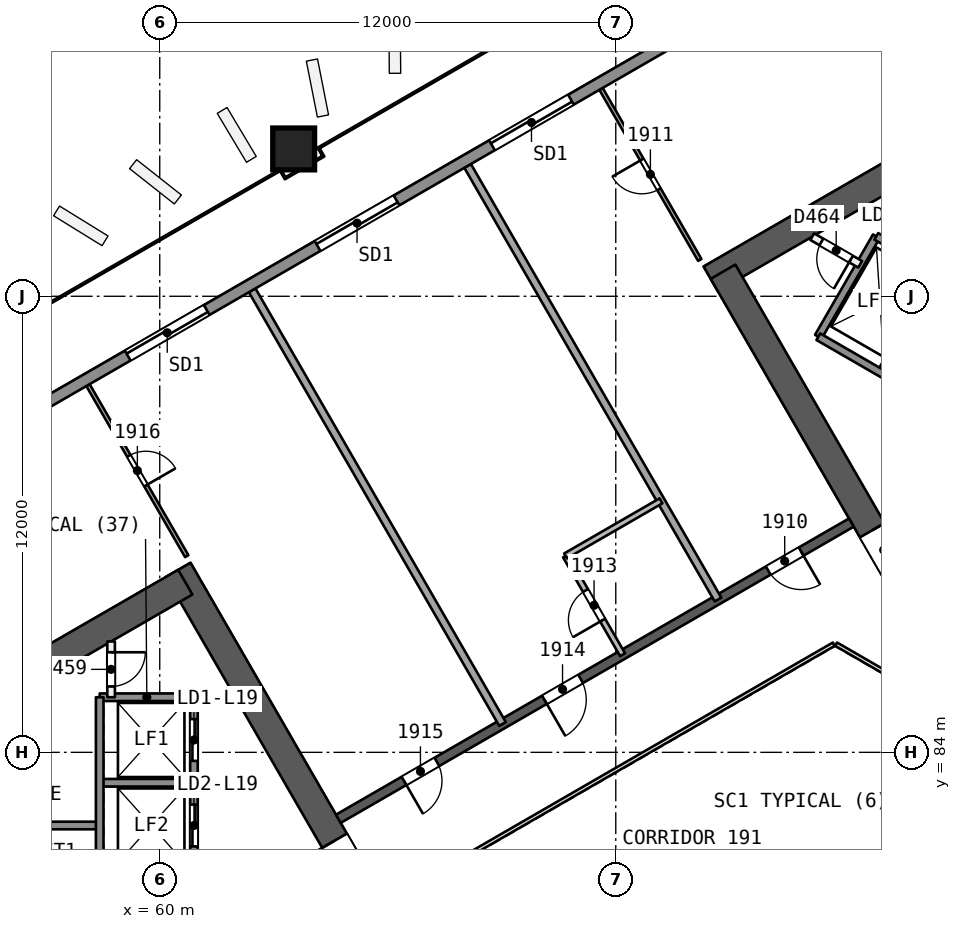
"""IFC4 building model, lengths in metres.
Left out: names, types, materials, properties, quantities, classifications, styles, units other than length and angle.
Written with IfcOpenShell. Run it as: python <this file> out.ifc"""

import sys

from ifc_helpers import new_model, si_unit, direction, frame, frame_2d, origin, origin_2d, place, context, subcontext, project, spatial, rectangle, extrude, element, fill, save


model = new_model("IFC4")
c1 = context("Model", 3, precision=1e-05, world=origin(), true_north=direction((0.0, 1.0)))
c2 = subcontext(c1, "Body", "Model", "MODEL_VIEW")
j1 = project(units=[si_unit("LENGTHUNIT", "METRE"), si_unit("PLANEANGLEUNIT", "RADIAN")], contexts=[c1])
p1 = place(None, origin())
s1 = spatial("IfcSite", under=j1, at=p1, CompositionType="ELEMENT")
p2 = place(p1, origin())
s2 = spatial("IfcBuilding", under=s1, at=p2, CompositionType="ELEMENT")
p3 = place(p2, frame((0.0, 0.0, 83.2)))
s3 = spatial("IfcBuildingStorey", under=s2, at=p3, CompositionType="ELEMENT", Elevation=83.2)
p4 = place(p3, frame((65.567, 80.0, 0.0), z_axis=(0.0, 0.0, 1.0), x_axis=(-0.499988615364, 0.866031976607, 0.0)))
e1 = element("IfcWall", 1, at=p4, inside=s3, PredefinedType="SHEAR", context=c2, shape_type="SweptSolid", body=[
    extrude(rectangle(XDim=10.163, YDim=0.75, at=frame_2d((5.082, 0.0))), origin(), (0.0, 0.0, 1.0), 3.7),
])
p5 = place(p4, frame((0.733, 0.0, 0.0)))
e2 = element("IfcOpeningElement", 2, at=p5, cuts=e1, PredefinedType="OPENING", context=c2, shape_type="SweptSolid", body=[
    extrude(rectangle(XDim=1.2, YDim=2.1, at=frame_2d((0.6, 1.05))), frame((0.0, 0.385, 0.0), z_axis=(0.0, -1.0, 0.0), x_axis=(1.0, 0.0, 0.0)), (0.0, 0.0, 1.0), 0.771),
])
p6 = place(p3, frame((60.673, 88.477, 0.0), z_axis=(0.0, 0.0, 1.0), x_axis=(-0.8660248072, -0.500001033313, 0.0)))
e3 = element("IfcWall", 3, at=p6, inside=s3, PredefinedType="SHEAR", context=c2, shape_type="SweptSolid", body=[
    extrude(rectangle(XDim=13.958, YDim=0.75, at=frame_2d((6.979, 0.0))), origin(), (0.0, 0.0, 1.0), 3.7),
])
p7 = place(p3, frame((86.723, 103.517, 0.0), z_axis=(0.0, 0.0, 1.0), x_axis=(-0.866020851292, -0.500007885066, 0.0)))
e4 = element("IfcWall", 4, at=p7, inside=s3, PredefinedType="SHEAR", context=c2, shape_type="SweptSolid", body=[
    extrude(rectangle(XDim=14.117, YDim=0.75, at=frame_2d((7.059, 0.0))), origin(), (0.0, 0.0, 1.0), 3.7),
])
p8 = place(p3, frame((74.822, 96.646, 0.0), z_axis=(0.0, 0.0, 1.0), x_axis=(0.499997052475, -0.866027105532, 0.0)))
e5 = element("IfcWall", 5, at=p8, inside=s3, PredefinedType="SHEAR", context=c2, shape_type="SweptSolid", body=[
    extrude(rectangle(XDim=10.005, YDim=0.75, at=frame_2d((5.002, 0.0))), origin(), (0.0, 0.0, 1.0), 3.7),
])
p9 = place(p8, frame((7.855, 0.0, 0.0)))
e6 = element("IfcOpeningElement", 6, at=p9, cuts=e5, PredefinedType="OPENING", context=c2, shape_type="SweptSolid", body=[
    extrude(rectangle(XDim=1.2, YDim=2.1, at=frame_2d((0.6, 1.05))), frame((0.0, 0.385, 0.0), z_axis=(0.0, -1.0, 0.0), x_axis=(1.0, 0.0, 0.0)), (0.0, 0.0, 1.0), 0.771),
])
p10 = place(p3, frame((78.2, 90.046, 0.0), z_axis=(0.0, 0.0, 1.0), x_axis=(-0.866026492143, -0.499998114903, 0.0)))
e7 = element("IfcWall", 7, at=p10, inside=s3, PredefinedType="SHEAR", context=c2, shape_type="SweptSolid", body=[
    extrude(rectangle(XDim=15.588, YDim=0.25, at=frame_2d((7.794, 0.0))), origin(), (0.0, 0.0, 1.0), 3.2),
])
p11 = place(p10, frame((1.527, 0.0, 0.0)))
e8 = element("IfcOpeningElement", 8, at=p11, cuts=e7, PredefinedType="OPENING", context=c2, shape_type="SweptSolid", body=[
    extrude(rectangle(XDim=1.0, YDim=2.1, at=frame_2d((0.5, 1.05))), frame((0.0, 0.135, 0.0), z_axis=(0.0, -1.0, 0.0), x_axis=(1.0, 0.0, 0.0)), (0.0, 0.0, 1.0), 0.271),
])
p12 = place(p10, frame((8.227, 0.0, 0.0)))
e9 = element("IfcOpeningElement", 9, at=p12, cuts=e7, PredefinedType="OPENING", context=c2, shape_type="SweptSolid", body=[
    extrude(rectangle(XDim=1.1, YDim=2.1, at=frame_2d((0.55, 1.05))), frame((0.0, 0.135, 0.0), z_axis=(0.0, -1.0, 0.0), x_axis=(1.0, 0.0, 0.0)), (0.0, 0.0, 1.0), 0.271),
])
p13 = place(p10, frame((12.594, 0.0, 0.0)))
e10 = element("IfcOpeningElement", 10, at=p13, cuts=e7, PredefinedType="OPENING", context=c2, shape_type="SweptSolid", body=[
    extrude(rectangle(XDim=1.0, YDim=2.1, at=frame_2d((0.5, 1.05))), frame((0.0, 0.135, 0.0), z_axis=(0.0, -1.0, 0.0), x_axis=(1.0, 0.0, 0.0)), (0.0, 0.0, 1.0), 0.271),
])
p14 = place(p3, frame((63.512, 99.898, 0.0), z_axis=(0.010093620709, -0.017482414954, 0.999796221231), x_axis=(-0.499897086036, 0.865849517735, 0.020187025824)))
e11 = element("IfcColumn", 11, at=p14, inside=s3, PredefinedType="COLUMN", context=c2, shape_type="SweptSolid", body=[
    extrude(rectangle(XDim=1.1, YDim=1.1, at=origin_2d()), origin(), (0.0, 0.0, 1.0), 3.701),
])
p15 = place(p3, frame((74.21, 96.956, 0.0), z_axis=(0.0, 0.0, 1.0), x_axis=(-0.499973171224, 0.866040892832, 0.0)))
e12 = element("IfcWall", 12, at=p15, inside=s3, PredefinedType="PARTITIONING", context=c2, shape_type="SweptSolid", body=[
    extrude(rectangle(XDim=5.198, YDim=0.1, at=frame_2d((2.599, 0.0))), origin(), (0.0, 0.0, 1.0), 3.2),
])
p16 = place(p15, frame((2.149, 0.0, 0.0)))
e13 = element("IfcOpeningElement", 13, at=p16, cuts=e12, PredefinedType="OPENING", context=c2, shape_type="SweptSolid", body=[
    extrude(rectangle(XDim=0.9, YDim=2.1, at=frame_2d((0.45, 1.05))), frame((0.0, 0.061, 0.0), z_axis=(0.0, -1.0, 0.0), x_axis=(1.0, 0.0, 0.0)), (0.0, 0.0, 1.0), 0.121),
])
p17 = place(p3, frame((68.102, 99.431, 0.0), z_axis=(0.0, 0.0, 1.0), x_axis=(0.499992964734, -0.866029465559, 0.0)))
e14 = element("IfcWall", 14, at=p17, inside=s3, PredefinedType="PARTITIONING", context=c2, shape_type="SweptSolid", body=[
    extrude(rectangle(XDim=13.177, YDim=0.2, at=frame_2d((6.588, 0.0))), origin(), (0.0, 0.0, 1.0), 3.2),
])
p18 = place(p3, frame((72.178, 86.569, 0.0), z_axis=(0.0, 0.0, 1.0), x_axis=(-0.499990139034, 0.866031096941, 0.0)))
e15 = element("IfcWall", 15, at=p18, inside=s3, PredefinedType="PARTITIONING", context=c2, shape_type="SweptSolid", body=[
    extrude(rectangle(XDim=3.0, YDim=0.15, at=frame_2d((1.5, 0.0))), origin(), (0.0, 0.0, 1.0), 3.2),
])
p19 = place(p18, frame((1.05, 0.0, 0.0)))
e16 = element("IfcOpeningElement", 16, at=p19, cuts=e15, PredefinedType="OPENING", context=c2, shape_type="SweptSolid", body=[
    extrude(rectangle(XDim=0.9, YDim=2.1, at=frame_2d((0.45, 1.05))), frame((0.0, 0.085, 0.0), z_axis=(0.0, -1.0, 0.0), x_axis=(1.0, 0.0, 0.0)), (0.0, 0.0, 1.0), 0.171),
])
p20 = place(p3, frame((70.678, 89.167, 0.0), z_axis=(0.0, 0.0, 1.0), x_axis=(0.866032775405, 0.499987231761, 0.0)))
e17 = element("IfcWall", 17, at=p20, inside=s3, PredefinedType="PARTITIONING", context=c2, shape_type="SweptSolid", body=[
    extrude(rectangle(XDim=2.9, YDim=0.15, at=frame_2d((1.45, 0.0))), origin(), (0.0, 0.0, 1.0), 3.2),
])
p21 = place(p3, frame((62.432, 96.157, 0.0), z_axis=(0.0, 0.0, 1.0), x_axis=(0.499992964734, -0.866029465559, 0.0)))
e18 = element("IfcWall", 18, at=p21, inside=s3, PredefinedType="PARTITIONING", context=c2, shape_type="SweptSolid", body=[
    extrude(rectangle(XDim=13.177, YDim=0.2, at=frame_2d((6.588, 0.0))), origin(), (0.0, 0.0, 1.0), 3.2),
])
p22 = place(p3, frame((58.112, 93.663, 0.0), z_axis=(0.0, 0.0, 1.0), x_axis=(0.499973171224, -0.866040892832, 0.0)))
e19 = element("IfcWall", 19, at=p22, inside=s3, PredefinedType="PARTITIONING", context=c2, shape_type="SweptSolid", body=[
    extrude(rectangle(XDim=5.198, YDim=0.1, at=frame_2d((2.599, 0.0))), origin(), (0.0, 0.0, 1.0), 3.2),
])
p23 = place(p22, frame((2.149, 0.0, 0.0)))
e20 = element("IfcOpeningElement", 20, at=p23, cuts=e19, PredefinedType="OPENING", context=c2, shape_type="SweptSolid", body=[
    extrude(rectangle(XDim=0.9, YDim=2.1, at=frame_2d((0.45, 1.05))), frame((0.0, 0.061, 0.0), z_axis=(0.0, -1.0, 0.0), x_axis=(1.0, 0.0, 0.0)), (0.0, 0.0, 1.0), 0.121),
])
p24 = place(p3, frame((39.353, 83.005, 0.0), z_axis=(0.0, 0.0, 1.0), x_axis=(0.866025832118, 0.499999258104, 0.0)))
e21 = element("IfcWall", 21, at=p24, inside=s3, PredefinedType="SOLIDWALL", context=c2, shape_type="SweptSolid", body=[
    extrude(rectangle(XDim=58.737, YDim=0.3, at=frame_2d((29.368, 0.0))), origin(), (0.0, 0.0, 1.0), 3.2),
])
p25 = place(p24, frame((28.636, 0.0, 0.0)))
e22 = element("IfcOpeningElement", 22, at=p25, cuts=e21, PredefinedType="OPENING", context=c2, shape_type="SweptSolid", body=[
    extrude(rectangle(XDim=2.4, YDim=2.4, at=frame_2d((1.2, 1.2))), frame((0.0, 0.161, 0.0), z_axis=(0.0, -1.0, 0.0), x_axis=(1.0, 0.0, 0.0)), (0.0, 0.0, 1.0), 0.321),
])
p26 = place(p24, frame((33.936, 0.0, 0.0)))
e23 = element("IfcOpeningElement", 23, at=p26, cuts=e21, PredefinedType="OPENING", context=c2, shape_type="SweptSolid", body=[
    extrude(rectangle(XDim=2.4, YDim=2.4, at=frame_2d((1.2, 1.2))), frame((0.0, 0.161, 0.0), z_axis=(0.0, -1.0, 0.0), x_axis=(1.0, 0.0, 0.0)), (0.0, 0.0, 1.0), 0.321),
])
p27 = place(p24, frame((45.575, 0.0, 0.0)))
e24 = element("IfcOpeningElement", 24, at=p27, cuts=e21, PredefinedType="OPENING", context=c2, shape_type="SweptSolid", body=[
    extrude(rectangle(XDim=2.4, YDim=2.4, at=frame_2d((1.2, 1.2))), frame((0.0, 0.161, 0.0), z_axis=(0.0, -1.0, 0.0), x_axis=(1.0, 0.0, 0.0)), (0.0, 0.0, 1.0), 0.321),
])
p28 = place(p24, frame((22.868, 0.0, 0.0)))
e25 = element("IfcOpeningElement", 25, at=p28, cuts=e21, PredefinedType="OPENING", context=c2, shape_type="SweptSolid", body=[
    extrude(rectangle(XDim=2.4, YDim=2.4, at=frame_2d((1.2, 1.2))), frame((0.0, 0.161, 0.0), z_axis=(0.0, -1.0, 0.0), x_axis=(1.0, 0.0, 0.0)), (0.0, 0.0, 1.0), 0.321),
])
p29 = place(p24, frame((10.765, 0.0, 0.0)))
e26 = element("IfcOpeningElement", 26, at=p29, cuts=e21, PredefinedType="OPENING", context=c2, shape_type="SweptSolid", body=[
    extrude(rectangle(XDim=2.4, YDim=2.4, at=frame_2d((1.2, 1.2))), frame((0.0, 0.161, 0.0), z_axis=(0.0, -1.0, 0.0), x_axis=(1.0, 0.0, 0.0)), (0.0, 0.0, 1.0), 0.321),
])
for number, where, z_axis, x_axis in (
    (27, (60.9, 85.45, 0.0), (0.0, 0.0, 1.0), (-1.0, 0.0, 0.0)),
    (28, (60.9, 83.2, 0.0), (0.0, 0.0, 1.0), (-1.0, 0.0, 0.0)),
):
    element("IfcWall", number, at=place(p3, frame(where, z_axis=z_axis, x_axis=x_axis)), inside=s3, PredefinedType="SOLIDWALL", context=c2, shape_type="SweptSolid", body=[
        extrude(rectangle(XDim=2.48, YDim=0.2, at=frame_2d((1.24, 0.0))), origin(), (0.0, 0.0, 1.0), 3.2),
    ])
p30 = place(p3, frame((58.42, 82.075, 0.0), z_axis=(0.0, 0.0, 1.0), x_axis=(-1.0, 0.0, 0.0)))
e29 = element("IfcWall", 29, at=p30, inside=s3, PredefinedType="SOLIDWALL", context=c2, shape_type="SweptSolid", body=[
    extrude(rectangle(XDim=7.7, YDim=0.2, at=frame_2d((3.85, 0.0))), origin(), (0.0, 0.0, 1.0), 3.2),
])
p31 = place(p3, frame((60.9, 85.45, 0.0), z_axis=(0.0, 0.0, 1.0), x_axis=(0.0, -1.0, 0.0)))
e30 = element("IfcWall", 30, at=p31, inside=s3, PredefinedType="SOLIDWALL", context=c2, shape_type="SweptSolid", body=[
    extrude(rectangle(XDim=10.9, YDim=0.2, at=frame_2d((5.45, 0.0))), origin(), (0.0, 0.0, 1.0), 3.2),
])
p32 = place(p31, frame((0.575, 0.0, 0.0)))
e31 = element("IfcOpeningElement", 31, at=p32, cuts=e30, PredefinedType="OPENING", context=c2, shape_type="SweptSolid", body=[
    extrude(rectangle(XDim=1.1, YDim=2.1, at=frame_2d((0.55, 1.05))), frame((0.0, 0.11, 0.0), z_axis=(0.0, -1.0, 0.0), x_axis=(1.0, 0.0, 0.0)), (0.0, 0.0, 1.0), 0.221),
])
p33 = place(p31, frame((2.825, 0.0, 0.0)))
e32 = element("IfcOpeningElement", 32, at=p33, cuts=e30, PredefinedType="OPENING", context=c2, shape_type="SweptSolid", body=[
    extrude(rectangle(XDim=1.1, YDim=2.1, at=frame_2d((0.55, 1.05))), frame((0.0, 0.11, 0.0), z_axis=(0.0, -1.0, 0.0), x_axis=(1.0, 0.0, 0.0)), (0.0, 0.0, 1.0), 0.221),
])
p34 = place(p31, frame((5.075, 0.0, 0.0)))
e33 = element("IfcOpeningElement", 33, at=p34, cuts=e30, PredefinedType="OPENING", context=c2, shape_type="SweptSolid", body=[
    extrude(rectangle(XDim=1.1, YDim=2.1, at=frame_2d((0.55, 1.05))), frame((0.0, 0.11, 0.0), z_axis=(0.0, -1.0, 0.0), x_axis=(1.0, 0.0, 0.0)), (0.0, 0.0, 1.0), 0.221),
])
p35 = place(p31, frame((7.325, 0.0, 0.0)))
e34 = element("IfcOpeningElement", 34, at=p35, cuts=e30, PredefinedType="OPENING", context=c2, shape_type="SweptSolid", body=[
    extrude(rectangle(XDim=1.1, YDim=2.1, at=frame_2d((0.55, 1.05))), frame((0.0, 0.11, 0.0), z_axis=(0.0, -1.0, 0.0), x_axis=(1.0, 0.0, 0.0)), (0.0, 0.0, 1.0), 0.221),
])
p36 = place(p3, frame((58.72, 86.917, 0.0), z_axis=(0.0, 0.0, 1.0), x_axis=(0.0, -1.0, 0.0)))
e35 = element("IfcWall", 35, at=p36, inside=s3, PredefinedType="PARTITIONING", context=c2, shape_type="SweptSolid", body=[
    extrude(rectangle(XDim=1.467, YDim=0.2, at=frame_2d((0.733, 0.0))), origin(), (0.0, 0.0, 1.0), 3.2),
])
p37 = place(p36, frame((0.283, 0.0, 0.0)))
e36 = element("IfcOpeningElement", 36, at=p37, cuts=e35, PredefinedType="OPENING", context=c2, shape_type="SweptSolid", body=[
    extrude(rectangle(XDim=0.9, YDim=2.1, at=frame_2d((0.45, 1.05))), frame((0.0, 0.11, 0.0), z_axis=(0.0, -1.0, 0.0), x_axis=(1.0, 0.0, 0.0)), (0.0, 0.0, 1.0), 0.221),
])
p38 = place(p3, frame((58.42, 85.45, 0.0), z_axis=(0.0, 0.0, 1.0), x_axis=(0.0, -1.0, 0.0)))
e37 = element("IfcWall", 37, at=p38, inside=s3, PredefinedType="SOLIDWALL", context=c2, shape_type="SweptSolid", body=[
    extrude(rectangle(XDim=9.0, YDim=0.2, at=frame_2d((4.5, 0.0))), origin(), (0.0, 0.0, 1.0), 3.2),
])
for number, where, z_axis, x_axis in (
    (38, (78.976, 93.986, 0.0), (0.0, 0.0, 1.0), (0.5, 0.866, 0.0)),
    (39, (77.33, 94.936, 0.0), (0.0, 0.0, 1.0), (0.5, 0.866, 0.0)),
):
    element("IfcWall", number, at=place(p3, frame(where, z_axis=z_axis, x_axis=x_axis)), inside=s3, PredefinedType="SOLIDWALL", context=c2, shape_type="SweptSolid", body=[
        extrude(rectangle(XDim=3.05, YDim=0.2, at=frame_2d((1.525, 0.0))), origin(), (0.0, 0.0, 1.0), 3.2),
    ])
p39 = place(p3, frame((86.77, 89.486, 0.0), z_axis=(0.0, 0.0, 1.0), x_axis=(-0.86601811187, 0.500012629753, 0.0)))
e40 = element("IfcWall", 40, at=p39, inside=s3, PredefinedType="SOLIDWALL", context=c2, shape_type="SweptSolid", body=[
    extrude(rectangle(XDim=10.9, YDim=0.2, at=frame_2d((5.45, 0.0))), origin(), (0.0, 0.0, 1.0), 3.2),
])
p40 = place(p3, frame((78.43, 96.841, 0.0), z_axis=(0.0, 0.0, 1.0), x_axis=(-0.866045896294, 0.499964504253, 0.0)))
e41 = element("IfcWall", 41, at=p40, inside=s3, PredefinedType="PARTITIONING", context=c2, shape_type="SweptSolid", body=[
    extrude(rectangle(XDim=1.455, YDim=0.2, at=frame_2d((0.728, 0.0))), origin(), (0.0, 0.0, 1.0), 3.2),
])
p41 = place(p40, frame((0.278, 0.0, 0.0)))
e42 = element("IfcOpeningElement", 42, at=p41, cuts=e41, PredefinedType="OPENING", context=c2, shape_type="SweptSolid", body=[
    extrude(rectangle(XDim=0.9, YDim=2.1, at=frame_2d((0.45, 1.05))), frame((0.0, 0.11, 0.0), z_axis=(0.0, -1.0, 0.0), x_axis=(1.0, 0.0, 0.0)), (0.0, 0.0, 1.0), 0.221),
])
p42 = place(p3, frame((80.5, 96.627, 0.0), z_axis=(0.0, 0.0, 1.0), x_axis=(-0.86601224135, 0.500022797313, 0.0)))
e43 = element("IfcWall", 43, at=p42, inside=s3, PredefinedType="SOLIDWALL", context=c2, shape_type="SweptSolid", body=[
    extrude(rectangle(XDim=1.9, YDim=0.2, at=frame_2d((0.95, 0.0))), origin(), (0.0, 0.0, 1.0), 3.2),
])
p43 = place(p42, frame((0.4, 0.0, 0.0)))
e44 = element("IfcOpeningElement", 44, at=p43, cuts=e43, PredefinedType="OPENING", context=c2, shape_type="SweptSolid", body=[
    extrude(rectangle(XDim=1.1, YDim=2.1, at=frame_2d((0.55, 1.05))), frame((0.0, 0.11, 0.0), z_axis=(0.0, -1.0, 0.0), x_axis=(1.0, 0.0, 0.0)), (0.0, 0.0, 1.0), 0.221),
])
p44 = place(p3, frame((79.53, 85.846, 0.0), z_axis=(0.0, 0.0, 1.0), x_axis=(-0.866041268327, 0.499972520799, 0.0)))
e45 = element("IfcWall", 45, at=p44, inside=s3, PredefinedType="PARTITIONING", context=c2, shape_type="SweptSolid", body=[
    extrude(rectangle(XDim=2.0, YDim=0.1, at=frame_2d((1.0, 0.0))), origin(), (0.0, 0.0, 1.0), 3.2),
])
p45 = place(p3, frame((77.738, 86.846, 0.0), z_axis=(0.0, 0.0, 1.0), x_axis=(-0.866026658274, -0.499997827154, 0.0)))
e46 = element("IfcWall", 46, at=p45, inside=s3, PredefinedType="PARTITIONING", context=c2, shape_type="SweptSolid", body=[
    extrude(rectangle(XDim=11.588, YDim=0.1, at=frame_2d((5.794, 0.0))), origin(), (0.0, 0.0, 1.0), 3.2),
])
p46 = place(p11, origin())
e47 = element("IfcDoor", 47, at=p46, inside=s3, OperationType="SINGLE_SWING_LEFT", PredefinedType="NOTDEFINED", context=c2, shape_type="SweptSolid", body=[
    extrude(rectangle(XDim=1.0, YDim=2.1, at=frame_2d((0.5, 1.05))), frame((0.0, 0.025, 0.0), z_axis=(0.0, -1.0, 0.0), x_axis=(1.0, 0.0, 0.0)), (0.0, 0.0, 1.0), 0.05),
])
fill(e8, e47)
p47 = place(p16, origin())
e48 = element("IfcDoor", 48, at=p47, inside=s3, OperationType="SINGLE_SWING_RIGHT", PredefinedType="NOTDEFINED", context=c2, shape_type="SweptSolid", body=[
    extrude(rectangle(XDim=0.9, YDim=2.1, at=frame_2d((0.45, 1.05))), frame((0.0, 0.025, 0.0), z_axis=(0.0, -1.0, 0.0), x_axis=(1.0, 0.0, 0.0)), (0.0, 0.0, 1.0), 0.05),
])
fill(e13, e48)
p48 = place(p19, origin())
e49 = element("IfcDoor", 49, at=p48, inside=s3, OperationType="SINGLE_SWING_LEFT", PredefinedType="NOTDEFINED", context=c2, shape_type="SweptSolid", body=[
    extrude(rectangle(XDim=0.9, YDim=2.1, at=frame_2d((0.45, 1.05))), frame((0.0, 0.025, 0.0), z_axis=(0.0, -1.0, 0.0), x_axis=(1.0, 0.0, 0.0)), (0.0, 0.0, 1.0), 0.05),
])
fill(e16, e49)
p49 = place(p12, origin())
e50 = element("IfcDoor", 50, at=p49, inside=s3, OperationType="SINGLE_SWING_RIGHT", PredefinedType="NOTDEFINED", context=c2, shape_type="SweptSolid", body=[
    extrude(rectangle(XDim=1.1, YDim=2.1, at=frame_2d((0.55, 1.05))), frame((0.0, 0.025, 0.0), z_axis=(0.0, -1.0, 0.0), x_axis=(1.0, 0.0, 0.0)), (0.0, 0.0, 1.0), 0.05),
])
fill(e9, e50)
p50 = place(p13, origin())
e51 = element("IfcDoor", 51, at=p50, inside=s3, OperationType="SINGLE_SWING_RIGHT", PredefinedType="NOTDEFINED", context=c2, shape_type="SweptSolid", body=[
    extrude(rectangle(XDim=1.0, YDim=2.1, at=frame_2d((0.5, 1.05))), frame((0.0, 0.025, 0.0), z_axis=(0.0, -1.0, 0.0), x_axis=(1.0, 0.0, 0.0)), (0.0, 0.0, 1.0), 0.05),
])
fill(e10, e51)
p51 = place(p23, origin())
e52 = element("IfcDoor", 52, at=p51, inside=s3, OperationType="SINGLE_SWING_RIGHT", PredefinedType="NOTDEFINED", context=c2, shape_type="SweptSolid", body=[
    extrude(rectangle(XDim=0.9, YDim=2.1, at=frame_2d((0.45, 1.05))), frame((0.0, 0.025, 0.0), z_axis=(0.0, -1.0, 0.0), x_axis=(1.0, 0.0, 0.0)), (0.0, 0.0, 1.0), 0.05),
])
fill(e20, e52)
p52 = place(p25, origin())
e53 = element("IfcDoor", 53, at=p52, inside=s3, OperationType="SLIDING_TO_LEFT", PredefinedType="NOTDEFINED", context=c2, shape_type="SweptSolid", body=[
    extrude(rectangle(XDim=2.4, YDim=2.4, at=frame_2d((1.2, 1.2))), frame((0.0, 0.025, 0.0), z_axis=(0.0, -1.0, 0.0), x_axis=(1.0, 0.0, 0.0)), (0.0, 0.0, 1.0), 0.05),
])
fill(e22, e53)
p53 = place(p26, origin())
e54 = element("IfcDoor", 54, at=p53, inside=s3, OperationType="SLIDING_TO_RIGHT", PredefinedType="NOTDEFINED", context=c2, shape_type="SweptSolid", body=[
    extrude(rectangle(XDim=2.4, YDim=2.4, at=frame_2d((1.2, 1.2))), frame((0.0, 0.025, 0.0), z_axis=(0.0, -1.0, 0.0), x_axis=(1.0, 0.0, 0.0)), (0.0, 0.0, 1.0), 0.05),
])
fill(e23, e54)
p54 = place(p28, origin())
e55 = element("IfcDoor", 55, at=p54, inside=s3, OperationType="SLIDING_TO_RIGHT", PredefinedType="NOTDEFINED", context=c2, shape_type="SweptSolid", body=[
    extrude(rectangle(XDim=2.4, YDim=2.4, at=frame_2d((1.2, 1.2))), frame((0.0, 0.025, 0.0), z_axis=(0.0, -1.0, 0.0), x_axis=(1.0, 0.0, 0.0)), (0.0, 0.0, 1.0), 0.05),
])
fill(e25, e55)
p55 = place(p5, origin())
e56 = element("IfcDoor", 56, at=p55, inside=s3, OperationType="SINGLE_SWING_RIGHT", PredefinedType="NOTDEFINED", context=c2, shape_type="SweptSolid", body=[
    extrude(rectangle(XDim=1.2, YDim=2.1, at=frame_2d((0.6, 1.05))), frame((0.0, 0.025, 0.0), z_axis=(0.0, -1.0, 0.0), x_axis=(1.0, 0.0, 0.0)), (0.0, 0.0, 1.0), 0.05),
])
fill(e2, e56)
p56 = place(p32, origin())
e57 = element("IfcDoor", 57, at=p56, inside=s3, OperationType="SLIDING_TO_RIGHT", PredefinedType="NOTDEFINED", context=c2, shape_type="SweptSolid", body=[
    extrude(rectangle(XDim=1.1, YDim=2.1, at=frame_2d((0.55, 1.05))), frame((0.0, 0.025, 0.0), z_axis=(0.0, -1.0, 0.0), x_axis=(1.0, 0.0, 0.0)), (0.0, 0.0, 1.0), 0.05),
])
fill(e31, e57)
p57 = place(p33, origin())
e58 = element("IfcDoor", 58, at=p57, inside=s3, OperationType="SLIDING_TO_LEFT", PredefinedType="NOTDEFINED", context=c2, shape_type="SweptSolid", body=[
    extrude(rectangle(XDim=1.1, YDim=2.1, at=frame_2d((0.55, 1.05))), frame((0.0, 0.025, 0.0), z_axis=(0.0, -1.0, 0.0), x_axis=(1.0, 0.0, 0.0)), (0.0, 0.0, 1.0), 0.05),
])
fill(e32, e58)
p58 = place(p37, origin())
e59 = element("IfcDoor", 59, at=p58, inside=s3, OperationType="SINGLE_SWING_LEFT", PredefinedType="NOTDEFINED", context=c2, shape_type="SweptSolid", body=[
    extrude(rectangle(XDim=0.9, YDim=2.1, at=frame_2d((0.45, 1.05))), frame((0.0, 0.025, 0.0), z_axis=(0.0, -1.0, 0.0), x_axis=(1.0, 0.0, 0.0)), (0.0, 0.0, 1.0), 0.05),
])
fill(e36, e59)
p59 = place(p9, origin())
e60 = element("IfcDoor", 60, at=p59, inside=s3, OperationType="SINGLE_SWING_LEFT", PredefinedType="NOTDEFINED", context=c2, shape_type="SweptSolid", body=[
    extrude(rectangle(XDim=1.2, YDim=2.1, at=frame_2d((0.6, 1.05))), frame((0.0, 0.025, 0.0), z_axis=(0.0, -1.0, 0.0), x_axis=(1.0, 0.0, 0.0)), (0.0, 0.0, 1.0), 0.05),
])
fill(e6, e60)
p60 = place(p41, origin())
e61 = element("IfcDoor", 61, at=p60, inside=s3, OperationType="SINGLE_SWING_LEFT", PredefinedType="NOTDEFINED", context=c2, shape_type="SweptSolid", body=[
    extrude(rectangle(XDim=0.9, YDim=2.1, at=frame_2d((0.45, 1.05))), frame((0.0, 0.025, 0.0), z_axis=(0.0, -1.0, 0.0), x_axis=(1.0, 0.0, 0.0)), (0.0, 0.0, 1.0), 0.05),
])
fill(e42, e61)
save(model, sys.argv[1])
